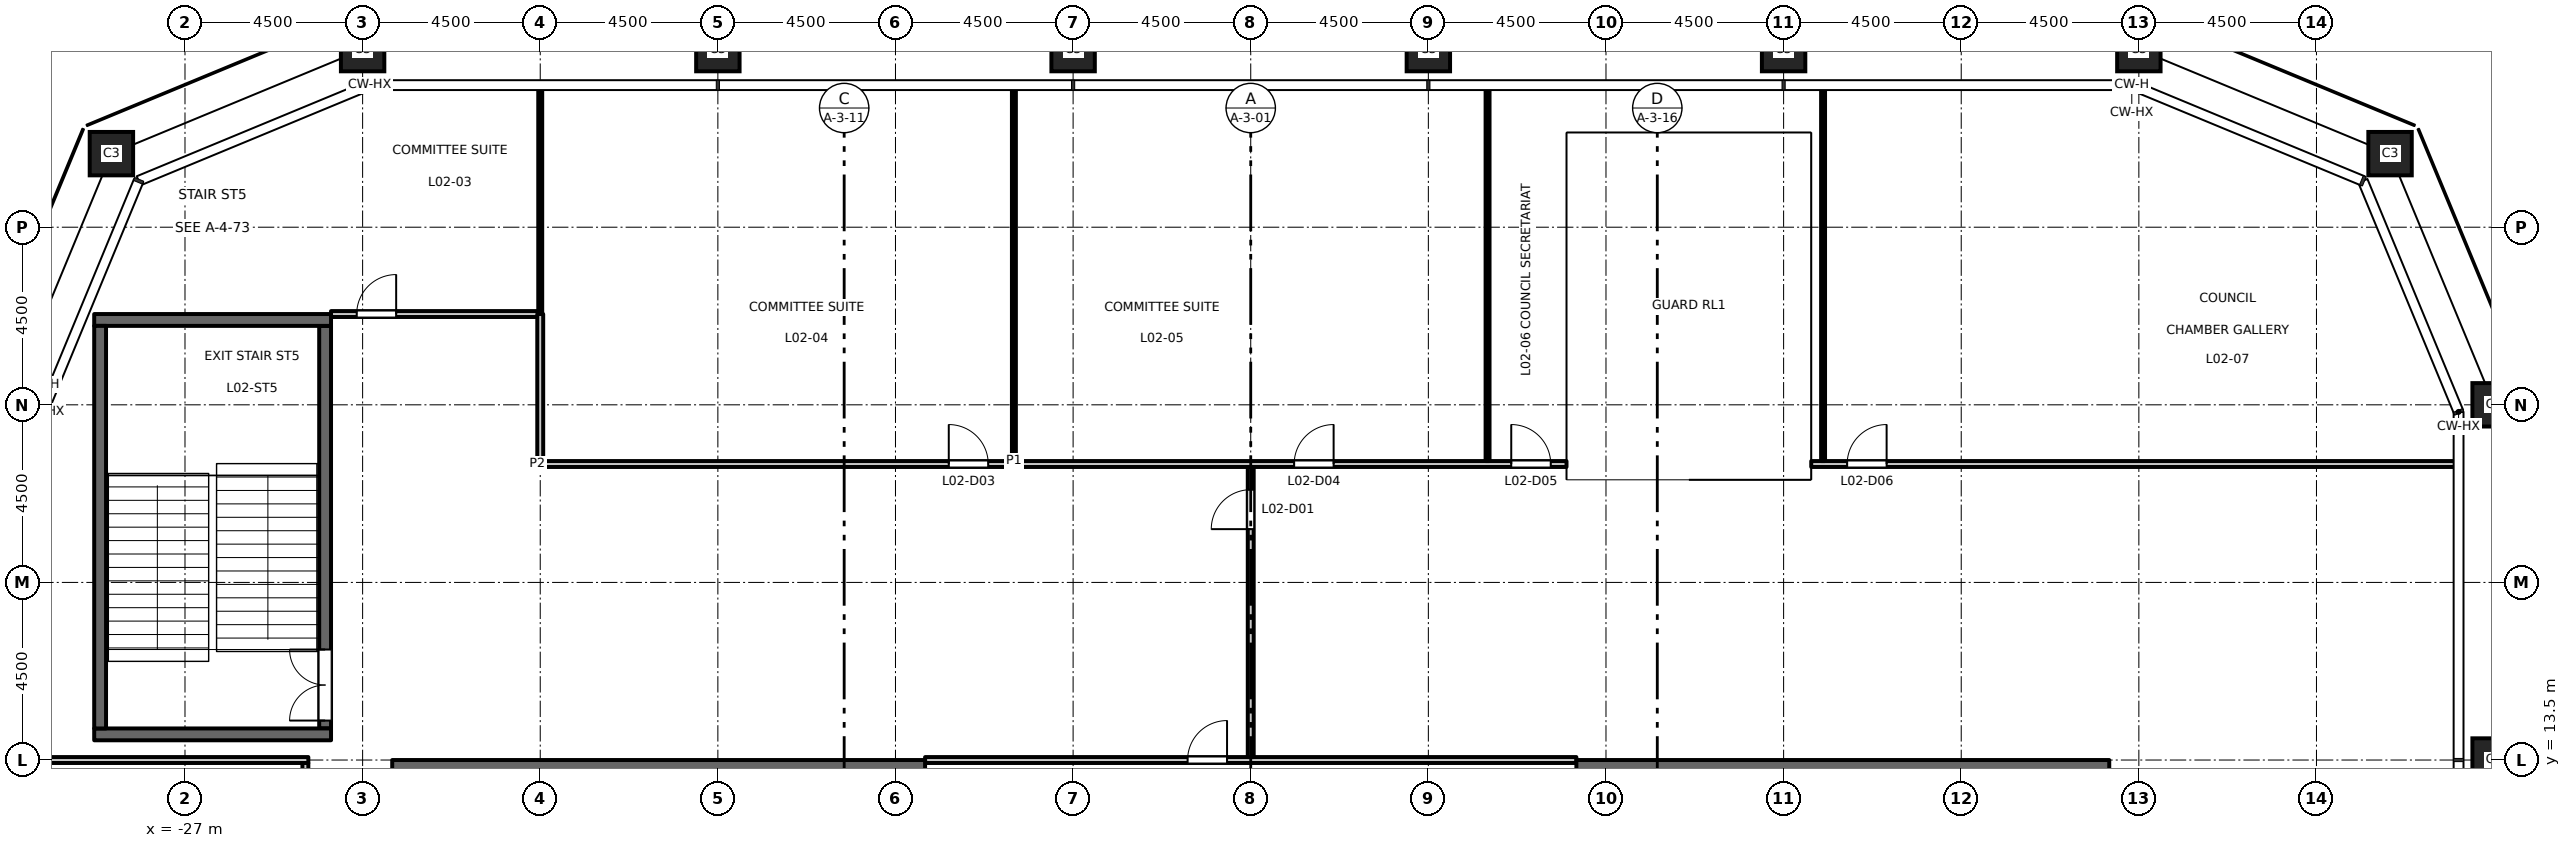
"""IFC4 building model, lengths in metres.
Left out: names, types, materials, properties, quantities, classifications, styles, units other than length and angle.
Written with IfcOpenShell. Run it as: python <this file> out.ifc"""

import sys

from ifc_helpers import new_model, si_unit, direction, frame, frame_2d, origin, origin_2d, place, context, subcontext, project, spatial, rectangle, hollow_rectangle, extrude, element, fill, save


model = new_model("IFC4")
c1 = context("Model", 3, precision=1e-05, world=origin(), true_north=direction((0.0, 1.0)))
c2 = subcontext(c1, "Body", "Model", "MODEL_VIEW")
j1 = project(units=[si_unit("LENGTHUNIT", "METRE"), si_unit("PLANEANGLEUNIT", "RADIAN")], contexts=[c1])
p1 = place(None, origin())
s1 = spatial("IfcSite", under=j1, at=p1, CompositionType="ELEMENT")
p2 = place(p1, origin())
s2 = spatial("IfcBuilding", under=s1, at=p2, CompositionType="ELEMENT")
p3 = place(p2, frame((0.0, 0.0, 12.2)))
s3 = spatial("IfcBuildingStorey", under=s2, at=p3, CompositionType="ELEMENT", Elevation=12.2)
for number, where, z_axis, x_axis in (
    (1, (31.5, 13.5, 0.0), (0.0, 0.0, 1.0), (1.0, 0.0, 0.0)),
    (2, (31.5, 22.5, 0.0), (0.0, 0.0, 1.0), (1.0, 0.0, 0.0)),
    (3, (28.864, 28.864, 0.0), (0.0, 0.0, 1.0), (1.0, 0.0, 0.0)),
    (4, (22.5, 31.5, 0.0), (0.0, 0.0, 1.0), (1.0, 0.0, 0.0)),
    (5, (13.5, 31.5, 0.0), (0.0, 0.0, 1.0), (1.0, 0.0, 0.0)),
    (6, (4.5, 31.5, 0.0), (0.0, 0.0, 1.0), (1.0, 0.0, 0.0)),
    (7, (-4.5, 31.5, 0.0), (0.0, 0.0, 1.0), (1.0, 0.0, 0.0)),
    (8, (-13.5, 31.5, 0.0), (0.0, 0.0, 1.0), (1.0, 0.0, 0.0)),
    (9, (-22.5, 31.5, 0.0), (0.0, 0.0, 1.0), (1.0, 0.0, 0.0)),
    (10, (-28.864, 28.864, 0.0), (0.0, 0.0, 1.0), (1.0, 0.0, 0.0)),
):
    element("IfcColumn", number, at=place(p3, frame(where, z_axis=z_axis, x_axis=x_axis)), inside=s3, PredefinedType="COLUMN", context=c2, shape_type="SweptSolid", body=[
        extrude(hollow_rectangle(XDim=1.1, YDim=1.1, WallThickness=0.07, at=origin_2d()), origin(), (0.0, 0.0, 1.0), 5.0),
    ])
for number, where, z_axis, x_axis in (
    (11, (-8.25, 13.25, 0.0), (0.0, 0.0, 1.0), (-1.0, 0.0, 0.0)),
    (12, (8.25, 13.25, 0.0), (0.0, 0.0, 1.0), (1.0, 0.0, 0.0)),
):
    element("IfcWall", number, at=place(p3, frame(where, z_axis=z_axis, x_axis=x_axis)), inside=s3, PredefinedType="SHEAR", context=c2, shape_type="SweptSolid", body=[
        extrude(rectangle(XDim=13.5, YDim=0.5, at=frame_2d((6.75, 0.0))), origin(), (0.0, 0.0, 1.0), 4.85),
    ])
p4 = place(p3, frame((-23.45, 14.3, 0.0), z_axis=(0.0, 0.0, 1.0), x_axis=(0.0, 1.0, 0.0)))
e13 = element("IfcWall", 13, at=p4, inside=s3, PredefinedType="SHEAR", context=c2, shape_type="SweptSolid", body=[
    extrude(rectangle(XDim=10.2, YDim=0.3, at=frame_2d((5.1, 0.0))), origin(), (0.0, 0.0, 1.0), 4.85),
])
p5 = place(p4, frame((0.2, 0.0, 0.0)))
e14 = element("IfcOpeningElement", 14, at=p5, cuts=e13, PredefinedType="OPENING", context=c2, shape_type="SweptSolid", body=[
    extrude(rectangle(XDim=1.8, YDim=2.1, at=frame_2d((0.9, 1.05))), frame((0.0, 0.16, 0.0), z_axis=(0.0, -1.0, 0.0), x_axis=(1.0, 0.0, 0.0)), (0.0, 0.0, 1.0), 0.32),
])
for number, where, z_axis, x_axis in (
    (15, (-29.3, 24.65, 0.0), (0.0, 0.0, 1.0), (1.0, 0.0, 0.0)),
    (16, (-29.3, 14.15, 0.0), (0.0, 0.0, 1.0), (1.0, 0.0, 0.0)),
):
    element("IfcWall", number, at=place(p3, frame(where, z_axis=z_axis, x_axis=x_axis)), inside=s3, PredefinedType="SHEAR", context=c2, shape_type="SweptSolid", body=[
        extrude(rectangle(XDim=6.0, YDim=0.3, at=frame_2d((3.0, 0.0))), origin(), (0.0, 0.0, 1.0), 4.85),
    ])
p6 = place(p3, frame((-29.15, 14.3, 0.0), z_axis=(0.0, 0.0, 1.0), x_axis=(0.0, 1.0, 0.0)))
e17 = element("IfcWall", 17, at=p6, inside=s3, PredefinedType="SHEAR", context=c2, shape_type="SweptSolid", body=[
    extrude(rectangle(XDim=10.2, YDim=0.3, at=frame_2d((5.1, 0.0))), origin(), (0.0, 0.0, 1.0), 4.85),
])
p7 = place(p3, frame((-30.51, 13.5, 0.0), z_axis=(0.0, 0.0, 1.0), x_axis=(1.0, 0.0, 0.0)))
e18 = element("IfcWall", 18, at=p7, inside=s3, PredefinedType="PARTITIONING", context=c2, shape_type="SweptSolid", body=[
    extrude(rectangle(XDim=6.635, YDim=0.15, at=frame_2d((3.317, 0.0))), origin(), (0.0, 0.0, 1.0), 3.85),
])
p8 = place(p3, frame((-8.25, 13.5, 0.0), z_axis=(0.0, 0.0, 1.0), x_axis=(1.0, 0.0, 0.0)))
e19 = element("IfcWall", 19, at=p8, inside=s3, PredefinedType="PARTITIONING", context=c2, shape_type="SweptSolid", body=[
    extrude(rectangle(XDim=16.5, YDim=0.15, at=frame_2d((8.25, 0.0))), origin(), (0.0, 0.0, 1.0), 4.35),
])
p9 = place(p8, frame((6.65, 0.0, 0.0)))
e20 = element("IfcOpeningElement", 20, at=p9, cuts=e19, PredefinedType="OPENING", context=c2, shape_type="SweptSolid", body=[
    extrude(rectangle(XDim=1.0, YDim=2.1, at=frame_2d((0.5, 1.05))), frame((0.0, 0.085, 0.0), z_axis=(0.0, -1.0, 0.0), x_axis=(1.0, 0.0, 0.0)), (0.0, 0.0, 1.0), 0.17),
])
p10 = place(p3, frame((-18.075, 21.0, 0.0), z_axis=(0.0, 0.0, 1.0), x_axis=(1.0, 0.0, 0.0)))
e21 = element("IfcWall", 21, at=p10, inside=s3, PredefinedType="PARTITIONING", context=c2, shape_type="SweptSolid", body=[
    extrude(rectangle(XDim=26.075, YDim=0.15, at=frame_2d((13.038, 0.0))), origin(), (0.0, 0.0, 1.0), 4.85),
])
p11 = place(p10, frame((10.425, 0.0, 0.0)))
e22 = element("IfcOpeningElement", 22, at=p11, cuts=e21, PredefinedType="OPENING", context=c2, shape_type="SweptSolid", body=[
    extrude(rectangle(XDim=1.0, YDim=2.1, at=frame_2d((0.5, 1.05))), frame((0.0, 0.085, 0.0), z_axis=(0.0, -1.0, 0.0), x_axis=(1.0, 0.0, 0.0)), (0.0, 0.0, 1.0), 0.17),
])
p12 = place(p10, frame((19.175, 0.0, 0.0)))
e23 = element("IfcOpeningElement", 23, at=p12, cuts=e21, PredefinedType="OPENING", context=c2, shape_type="SweptSolid", body=[
    extrude(rectangle(XDim=1.0, YDim=2.1, at=frame_2d((0.5, 1.05))), frame((0.0, 0.085, 0.0), z_axis=(0.0, -1.0, 0.0), x_axis=(1.0, 0.0, 0.0)), (0.0, 0.0, 1.0), 0.17),
])
p13 = place(p10, frame((24.675, 0.0, 0.0)))
e24 = element("IfcOpeningElement", 24, at=p13, cuts=e21, PredefinedType="OPENING", context=c2, shape_type="SweptSolid", body=[
    extrude(rectangle(XDim=1.0, YDim=2.1, at=frame_2d((0.5, 1.05))), frame((0.0, 0.085, 0.0), z_axis=(0.0, -1.0, 0.0), x_axis=(1.0, 0.0, 0.0)), (0.0, 0.0, 1.0), 0.17),
])
p14 = place(p3, frame((14.2, 21.0, 0.0), z_axis=(0.0, 0.0, 1.0), x_axis=(1.0, 0.0, 0.0)))
e25 = element("IfcWall", 25, at=p14, inside=s3, PredefinedType="PARTITIONING", context=c2, shape_type="SweptSolid", body=[
    extrude(rectangle(XDim=16.31, YDim=0.15, at=frame_2d((8.155, 0.0))), origin(), (0.0, 0.0, 1.0), 4.85),
])
p15 = place(p14, frame((0.91, 0.0, 0.0)))
e26 = element("IfcOpeningElement", 26, at=p15, cuts=e25, PredefinedType="OPENING", context=c2, shape_type="SweptSolid", body=[
    extrude(rectangle(XDim=1.0, YDim=2.1, at=frame_2d((0.5, 1.05))), frame((0.0, 0.085, 0.0), z_axis=(0.0, -1.0, 0.0), x_axis=(1.0, 0.0, 0.0)), (0.0, 0.0, 1.0), 0.17),
])
p16 = place(p3, frame((-23.3, 24.8, 0.0), z_axis=(0.0, 0.0, 1.0), x_axis=(1.0, 0.0, 0.0)))
e27 = element("IfcWall", 27, at=p16, inside=s3, PredefinedType="PARTITIONING", context=c2, shape_type="SweptSolid", body=[
    extrude(rectangle(XDim=5.25, YDim=0.15, at=frame_2d((2.625, 0.0))), origin(), (0.0, 0.0, 1.0), 4.85),
])
p17 = place(p16, frame((0.65, 0.0, 0.0)))
e28 = element("IfcOpeningElement", 28, at=p17, cuts=e27, PredefinedType="OPENING", context=c2, shape_type="SweptSolid", body=[
    extrude(rectangle(XDim=1.0, YDim=2.1, at=frame_2d((0.5, 1.05))), frame((0.0, 0.085, 0.0), z_axis=(0.0, -1.0, 0.0), x_axis=(1.0, 0.0, 0.0)), (0.0, 0.0, 1.0), 0.17),
])
p18 = place(p3, frame((-23.95, 3.075, 0.0), z_axis=(0.0, 0.0, 1.0), x_axis=(0.0, 1.0, 0.0)))
e29 = element("IfcWall", 29, at=p18, inside=s3, PredefinedType="PARTITIONING", context=c2, shape_type="SweptSolid", body=[
    extrude(rectangle(XDim=10.35, YDim=0.15, at=frame_2d((5.175, 0.0))), origin(), (0.0, 0.0, 1.0), 4.85),
])
p19 = place(p18, frame((8.775, 0.0, 0.0)))
e30 = element("IfcOpeningElement", 30, at=p19, cuts=e29, PredefinedType="OPENING", context=c2, shape_type="SweptSolid", body=[
    extrude(rectangle(XDim=1.0, YDim=2.1, at=frame_2d((0.5, 1.05))), frame((0.0, 0.085, 0.0), z_axis=(0.0, -1.0, 0.0), x_axis=(1.0, 0.0, 0.0)), (0.0, 0.0, 1.0), 0.17),
])
p20 = place(p3, frame((-18.0, 24.8, 0.0), z_axis=(0.0, 0.0, 1.0), x_axis=(0.0, 1.0, 0.0)))
e31 = element("IfcWall", 31, at=p20, inside=s3, PredefinedType="PARTITIONING", context=c2, shape_type="SweptSolid", body=[
    extrude(rectangle(XDim=5.71, YDim=0.1, at=frame_2d((2.855, 0.0))), origin(), (0.0, 0.0, 1.0), 4.85),
])
p21 = place(p3, frame((-18.0, 21.075, 0.0), z_axis=(0.0, 0.0, 1.0), x_axis=(0.0, 1.0, 0.0)))
e32 = element("IfcWall", 32, at=p21, inside=s3, PredefinedType="PARTITIONING", context=c2, shape_type="SweptSolid", body=[
    extrude(rectangle(XDim=3.725, YDim=0.15, at=frame_2d((1.863, 0.0))), origin(), (0.0, 0.0, 1.0), 4.85),
])
p22 = place(p3, frame((-6.0, 21.075, 0.0), z_axis=(0.0, 0.0, 1.0), x_axis=(0.0, 1.0, 0.0)))
e33 = element("IfcWall", 33, at=p22, inside=s3, PredefinedType="PARTITIONING", context=c2, shape_type="SweptSolid", body=[
    extrude(rectangle(XDim=9.435, YDim=0.1, at=frame_2d((4.718, 0.0))), origin(), (0.0, 0.0, 1.0), 4.85),
])
p23 = place(p3, frame((0.0, 13.575, 0.0), z_axis=(0.0, 0.0, 1.0), x_axis=(0.0, 1.0, 0.0)))
e34 = element("IfcWall", 34, at=p23, inside=s3, PredefinedType="PARTITIONING", context=c2, shape_type="SweptSolid", body=[
    extrude(rectangle(XDim=7.35, YDim=0.15, at=frame_2d((3.675, 0.0))), origin(), (0.0, 0.0, 1.0), 4.85),
])
p24 = place(p23, frame((5.775, 0.0, 0.0)))
e35 = element("IfcOpeningElement", 35, at=p24, cuts=e34, PredefinedType="OPENING", context=c2, shape_type="SweptSolid", body=[
    extrude(rectangle(XDim=1.0, YDim=2.1, at=frame_2d((0.5, 1.05))), frame((0.0, 0.085, 0.0), z_axis=(0.0, -1.0, 0.0), x_axis=(1.0, 0.0, 0.0)), (0.0, 0.0, 1.0), 0.17),
])
for number, where, z_axis, x_axis in (
    (36, (6.0, 21.075, 0.0), (0.0, 0.0, 1.0), (0.0, 1.0, 0.0)),
    (37, (14.5, 21.075, 0.0), (0.0, 0.0, 1.0), (0.0, 1.0, 0.0)),
):
    element("IfcWall", number, at=place(p3, frame(where, z_axis=z_axis, x_axis=x_axis)), inside=s3, PredefinedType="PARTITIONING", context=c2, shape_type="SweptSolid", body=[
        extrude(rectangle(XDim=9.435, YDim=0.1, at=frame_2d((4.718, 0.0))), origin(), (0.0, 0.0, 1.0), 4.85),
    ])
p25 = place(p5, origin())
e38 = element("IfcDoor", 38, at=p25, inside=s3, OperationType="DOUBLE_DOOR_SINGLE_SWING", PredefinedType="DOOR", context=c2, shape_type="SweptSolid", body=[
    extrude(rectangle(XDim=1.8, YDim=2.1, at=frame_2d((0.9, 1.05))), frame((0.0, 0.025, 0.0), z_axis=(0.0, -1.0, 0.0), x_axis=(1.0, 0.0, 0.0)), (0.0, 0.0, 1.0), 0.05),
])
fill(e14, e38)
p26 = place(p24, origin())
e39 = element("IfcDoor", 39, at=p26, inside=s3, OperationType="SINGLE_SWING_LEFT", PredefinedType="DOOR", context=c2, shape_type="SweptSolid", body=[
    extrude(rectangle(XDim=1.0, YDim=2.1, at=frame_2d((0.5, 1.05))), frame((0.0, 0.025, 0.0), z_axis=(0.0, -1.0, 0.0), x_axis=(1.0, 0.0, 0.0)), (0.0, 0.0, 1.0), 0.05),
])
fill(e35, e39)
p27 = place(p17, origin())
e40 = element("IfcDoor", 40, at=p27, inside=s3, OperationType="SINGLE_SWING_RIGHT", PredefinedType="DOOR", context=c2, shape_type="SweptSolid", body=[
    extrude(rectangle(XDim=1.0, YDim=2.1, at=frame_2d((0.5, 1.05))), frame((0.0, 0.025, 0.0), z_axis=(0.0, -1.0, 0.0), x_axis=(1.0, 0.0, 0.0)), (0.0, 0.0, 1.0), 0.05),
])
fill(e28, e40)
p28 = place(p11, origin())
e41 = element("IfcDoor", 41, at=p28, inside=s3, OperationType="SINGLE_SWING_LEFT", PredefinedType="DOOR", context=c2, shape_type="SweptSolid", body=[
    extrude(rectangle(XDim=1.0, YDim=2.1, at=frame_2d((0.5, 1.05))), frame((0.0, 0.025, 0.0), z_axis=(0.0, -1.0, 0.0), x_axis=(1.0, 0.0, 0.0)), (0.0, 0.0, 1.0), 0.05),
])
fill(e22, e41)
p29 = place(p12, origin())
e42 = element("IfcDoor", 42, at=p29, inside=s3, OperationType="SINGLE_SWING_RIGHT", PredefinedType="DOOR", context=c2, shape_type="SweptSolid", body=[
    extrude(rectangle(XDim=1.0, YDim=2.1, at=frame_2d((0.5, 1.05))), frame((0.0, 0.025, 0.0), z_axis=(0.0, -1.0, 0.0), x_axis=(1.0, 0.0, 0.0)), (0.0, 0.0, 1.0), 0.05),
])
fill(e23, e42)
p30 = place(p13, origin())
e43 = element("IfcDoor", 43, at=p30, inside=s3, OperationType="SINGLE_SWING_LEFT", PredefinedType="DOOR", context=c2, shape_type="SweptSolid", body=[
    extrude(rectangle(XDim=1.0, YDim=2.1, at=frame_2d((0.5, 1.05))), frame((0.0, 0.025, 0.0), z_axis=(0.0, -1.0, 0.0), x_axis=(1.0, 0.0, 0.0)), (0.0, 0.0, 1.0), 0.05),
])
fill(e24, e43)
p31 = place(p15, origin())
e44 = element("IfcDoor", 44, at=p31, inside=s3, OperationType="SINGLE_SWING_RIGHT", PredefinedType="DOOR", context=c2, shape_type="SweptSolid", body=[
    extrude(rectangle(XDim=1.0, YDim=2.1, at=frame_2d((0.5, 1.05))), frame((0.0, 0.025, 0.0), z_axis=(0.0, -1.0, 0.0), x_axis=(1.0, 0.0, 0.0)), (0.0, 0.0, 1.0), 0.05),
])
fill(e26, e44)
p32 = place(p9, origin())
e45 = element("IfcDoor", 45, at=p32, inside=s3, OperationType="SINGLE_SWING_RIGHT", PredefinedType="DOOR", context=c2, shape_type="SweptSolid", body=[
    extrude(rectangle(XDim=1.0, YDim=2.1, at=frame_2d((0.5, 1.05))), frame((0.0, 0.025, 0.0), z_axis=(0.0, -1.0, 0.0), x_axis=(1.0, 0.0, 0.0)), (0.0, 0.0, 1.0), 0.05),
])
fill(e20, e45)
save(model, sys.argv[1])
